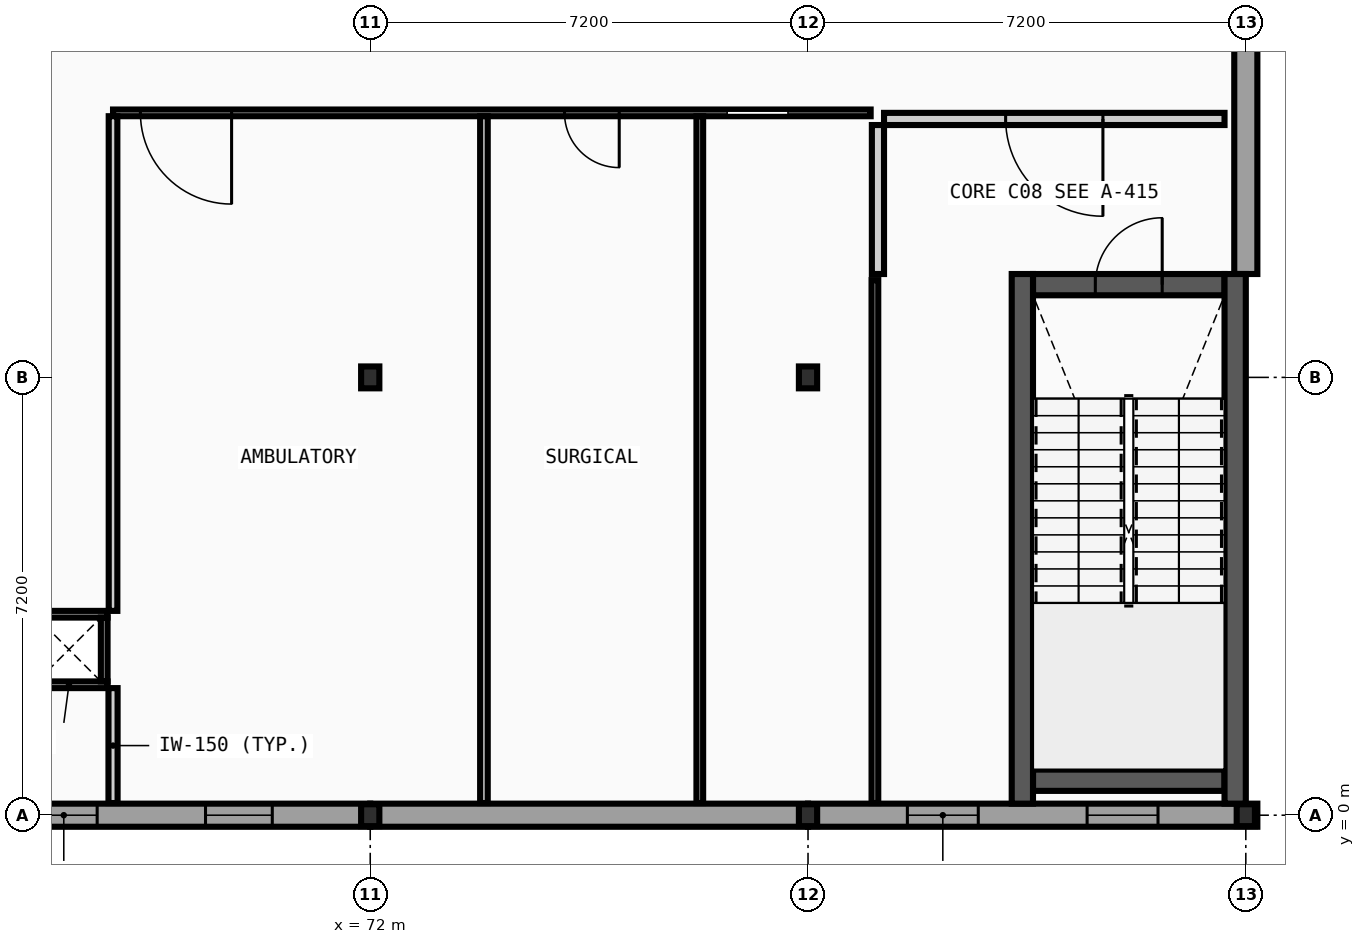
"""IFC4 building model, lengths in metres.
Left out: names, types, materials, properties, quantities, classifications, styles, units other than length and angle.
Written with IfcOpenShell. Run it as: python <this file> out.ifc"""

import sys

from ifc_helpers import new_model, si_unit, direction, frame, frame_2d, origin, origin_2d, place, context, subcontext, project, spatial, rectangle, i_section, extrude, element, fill, save


model = new_model("IFC4")
c1 = context("Model", 3, precision=1e-05, world=origin(), true_north=direction((0.0, 1.0)))
c2 = subcontext(c1, "Body", "Model", "MODEL_VIEW")
j1 = project(units=[si_unit("LENGTHUNIT", "METRE"), si_unit("PLANEANGLEUNIT", "RADIAN")], contexts=[c1])
p1 = place(None, origin())
s1 = spatial("IfcSite", under=j1, at=p1, CompositionType="ELEMENT")
p2 = place(p1, origin())
s2 = spatial("IfcBuilding", under=s1, at=p2, CompositionType="ELEMENT")
p3 = place(p2, frame((0.0, 0.0, 9.6)))
s3 = spatial("IfcBuildingStorey", under=s2, at=p3, CompositionType="ELEMENT", Elevation=9.6)
for number, where, z_axis, x_axis in (
    (1, (72.0, 0.0, 0.0), (0.0, 0.0, 1.0), (1.0, 0.0, 0.0)),
    (2, (72.0, 7.2, 0.0), (0.0, 0.0, 1.0), (1.0, 0.0, 0.0)),
    (3, (79.2, 0.0, 0.0), (0.0, 0.0, 1.0), (1.0, 0.0, 0.0)),
    (4, (79.2, 7.2, 0.0), (0.0, 0.0, 1.0), (1.0, 0.0, 0.0)),
    (5, (86.4, 0.0, 0.0), (0.0, 0.0, 1.0), (1.0, 0.0, 0.0)),
):
    element("IfcColumn", number, at=place(p3, frame(where, z_axis=z_axis, x_axis=x_axis)), inside=s3, PredefinedType="COLUMN", context=c2, shape_type="SweptSolid", body=[
        extrude(i_section(OverallWidth=0.3, OverallDepth=0.36, WebThickness=0.012, FlangeThickness=0.022, FilletRadius=0.027, at=origin_2d()), origin(), (0.0, 0.0, 1.0), 4.4),
    ])
p4 = place(p3, frame((64.8, 0.0, 0.0), z_axis=(0.0, 0.0, 1.0), x_axis=(1.0, 0.0, 0.0)))
e6 = element("IfcWall", 6, at=p4, inside=s3, PredefinedType="STANDARD", context=c2, shape_type="SweptSolid", body=[
    extrude(rectangle(XDim=7.2, YDim=0.38, at=frame_2d((3.6, 0.0))), origin(), (0.0, 0.0, 1.0), 3.895),
])
p5 = place(p4, frame((1.611, 0.0, 0.95)))
e7 = element("IfcOpeningElement", 7, at=p5, cuts=e6, PredefinedType="OPENING", context=c2, shape_type="SweptSolid", body=[
    extrude(rectangle(XDim=1.098, YDim=1.296, at=frame_2d((0.549, 0.648))), frame((0.0, 0.2, 0.0), z_axis=(0.0, -1.0, 0.0), x_axis=(1.0, 0.0, 0.0)), (0.0, 0.0, 1.0), 0.4),
])
p6 = place(p4, frame((4.491, 0.0, 0.95)))
e8 = element("IfcOpeningElement", 8, at=p6, cuts=e6, PredefinedType="OPENING", context=c2, shape_type="SweptSolid", body=[
    extrude(rectangle(XDim=1.098, YDim=1.296, at=frame_2d((0.549, 0.648))), frame((0.0, 0.2, 0.0), z_axis=(0.0, -1.0, 0.0), x_axis=(1.0, 0.0, 0.0)), (0.0, 0.0, 1.0), 0.4),
])
p7 = place(p3, frame((72.0, 0.0, 0.0), z_axis=(0.0, 0.0, 1.0), x_axis=(1.0, 0.0, 0.0)))
e9 = element("IfcWall", 9, at=p7, inside=s3, PredefinedType="STANDARD", context=c2, shape_type="SweptSolid", body=[
    extrude(rectangle(XDim=7.2, YDim=0.38, at=frame_2d((3.6, 0.0))), origin(), (0.0, 0.0, 1.0), 3.895),
])
p8 = place(p3, frame((79.2, 0.0, 0.0), z_axis=(0.0, 0.0, 1.0), x_axis=(1.0, 0.0, 0.0)))
e10 = element("IfcWall", 10, at=p8, inside=s3, PredefinedType="STANDARD", context=c2, shape_type="SweptSolid", body=[
    extrude(rectangle(XDim=7.39, YDim=0.38, at=frame_2d((3.695, 0.0))), origin(), (0.0, 0.0, 1.0), 3.895),
])
p9 = place(p8, frame((1.634, 0.0, 0.95)))
e11 = element("IfcOpeningElement", 11, at=p9, cuts=e10, PredefinedType="OPENING", context=c2, shape_type="SweptSolid", body=[
    extrude(rectangle(XDim=1.166, YDim=1.296, at=frame_2d((0.583, 0.648))), frame((0.0, 0.2, 0.0), z_axis=(0.0, -1.0, 0.0), x_axis=(1.0, 0.0, 0.0)), (0.0, 0.0, 1.0), 0.4),
])
p10 = place(p8, frame((4.59, 0.0, 0.95)))
e12 = element("IfcOpeningElement", 12, at=p10, cuts=e10, PredefinedType="OPENING", context=c2, shape_type="SweptSolid", body=[
    extrude(rectangle(XDim=1.166, YDim=1.296, at=frame_2d((0.583, 0.648))), frame((0.0, 0.2, 0.0), z_axis=(0.0, -1.0, 0.0), x_axis=(1.0, 0.0, 0.0)), (0.0, 0.0, 1.0), 0.4),
])
p11 = place(p3, frame((86.4, 8.9, 0.0), z_axis=(0.0, 0.0, 1.0), x_axis=(0.0, 1.0, 0.0)))
e13 = element("IfcWall", 13, at=p11, inside=s3, PredefinedType="STANDARD", context=c2, shape_type="SweptSolid", body=[
    extrude(rectangle(XDim=5.5, YDim=0.38, at=frame_2d((2.75, 0.0))), origin(), (0.0, 0.0, 1.0), 4.2),
])
p12 = place(p3, frame((82.9, 0.575, 0.0), z_axis=(0.0, 0.0, 1.0), x_axis=(1.0, 0.0, 0.0)))
e14 = element("IfcWall", 14, at=p12, inside=s3, PredefinedType="SHEAR", context=c2, shape_type="SweptSolid", body=[
    extrude(rectangle(XDim=3.15, YDim=0.35, at=frame_2d((1.575, 0.0))), origin(), (0.0, 0.0, 1.0), 4.2),
])
p13 = place(p3, frame((82.9, 8.725, 0.0), z_axis=(0.0, 0.0, 1.0), x_axis=(1.0, 0.0, 0.0)))
e15 = element("IfcWall", 15, at=p13, inside=s3, PredefinedType="SHEAR", context=c2, shape_type="SweptSolid", body=[
    extrude(rectangle(XDim=3.15, YDim=0.35, at=frame_2d((1.575, 0.0))), origin(), (0.0, 0.0, 1.0), 4.2),
])
p14 = place(p13, frame((1.025, 0.0, 0.0)))
e16 = element("IfcOpeningElement", 16, at=p14, cuts=e15, PredefinedType="OPENING", context=c2, shape_type="SweptSolid", body=[
    extrude(rectangle(XDim=1.1, YDim=2.15, at=frame_2d((0.55, 1.075))), frame((0.0, 0.185, 0.0), z_axis=(0.0, -1.0, 0.0), x_axis=(1.0, 0.0, 0.0)), (0.0, 0.0, 1.0), 0.37),
])
for number, where, z_axis, x_axis in (
    (17, (82.725, 0.19, 0.0), (0.0, 0.0, 1.0), (0.0, 1.0, 0.0)),
    (18, (86.225, 0.19, 0.0), (0.0, 0.0, 1.0), (0.0, 1.0, 0.0)),
):
    element("IfcWall", number, at=place(p3, frame(where, z_axis=z_axis, x_axis=x_axis)), inside=s3, PredefinedType="SHEAR", context=c2, shape_type="SweptSolid", body=[
        extrude(rectangle(XDim=8.71, YDim=0.35, at=frame_2d((4.355, 0.0))), origin(), (0.0, 0.0, 1.0), 4.2),
    ])
p15 = place(p3, frame((80.45, 11.45, 0.0), z_axis=(0.0, 0.0, 1.0), x_axis=(1.0, 0.0, 0.0)))
e19 = element("IfcWall", 19, at=p15, inside=s3, PredefinedType="PARTITIONING", context=c2, shape_type="SweptSolid", body=[
    extrude(rectangle(XDim=5.6, YDim=0.2, at=frame_2d((2.8, 0.0))), origin(), (0.0, 0.0, 1.0), 4.2),
])
p16 = place(p15, frame((2.0, 0.0, 0.0)))
e20 = element("IfcOpeningElement", 20, at=p16, cuts=e19, PredefinedType="OPENING", context=c2, shape_type="SweptSolid", body=[
    extrude(rectangle(XDim=1.6, YDim=2.2, at=frame_2d((0.8, 1.1))), frame((0.0, 0.11, 0.0), z_axis=(0.0, -1.0, 0.0), x_axis=(1.0, 0.0, 0.0)), (0.0, 0.0, 1.0), 0.22),
])
p17 = place(p3, frame((80.35, 8.9, 0.0), z_axis=(0.0, 0.0, 1.0), x_axis=(0.0, 1.0, 0.0)))
e21 = element("IfcWall", 21, at=p17, inside=s3, PredefinedType="PARTITIONING", context=c2, shape_type="SweptSolid", body=[
    extrude(rectangle(XDim=2.45, YDim=0.2, at=frame_2d((1.225, 0.0))), origin(), (0.0, 0.0, 1.0), 4.2),
])
for number, where, z_axis, x_axis in (
    (22, (66.41, 2.145, 0.0), (0.0, 0.0, 1.0), (1.0, 0.0, 0.0)),
    (23, (66.41, 3.305, 0.0), (0.0, 0.0, 1.0), (1.0, 0.0, 0.0)),
):
    element("IfcWall", number, at=place(p3, frame(where, z_axis=z_axis, x_axis=x_axis)), inside=s3, PredefinedType="PARTITIONING", context=c2, shape_type="SweptSolid", body=[
        extrude(rectangle(XDim=1.27, YDim=0.11, at=frame_2d((0.635, 0.0))), origin(), (0.0, 0.0, 1.0), 4.2),
    ])
p18 = place(p3, frame((67.625, 2.2, 0.0), z_axis=(0.0, 0.0, 1.0), x_axis=(0.0, 1.0, 0.0)))
e24 = element("IfcWall", 24, at=p18, inside=s3, PredefinedType="PARTITIONING", context=c2, shape_type="SweptSolid", body=[
    extrude(rectangle(XDim=1.05, YDim=0.11, at=frame_2d((0.525, 0.0))), origin(), (0.0, 0.0, 1.0), 4.2),
])
p19 = place(p3, frame((67.77, 11.55, 0.0), z_axis=(0.0, 0.0, 1.0), x_axis=(1.0, 0.0, 0.0)))
e25 = element("IfcWall", 25, at=p19, inside=s3, PredefinedType="PARTITIONING", context=c2, shape_type="SweptSolid", body=[
    extrude(rectangle(XDim=12.46, YDim=0.11, at=frame_2d((6.23, 0.0))), origin(), (0.0, 0.0, 1.0), 4.2),
])
p20 = place(p19, frame((10.1, 0.0, 0.0)))
e26 = element("IfcOpeningElement", 26, at=p20, cuts=e25, PredefinedType="OPENING", context=c2, shape_type="SweptSolid", body=[
    extrude(rectangle(XDim=1.0, YDim=2.1, at=frame_2d((0.5, 1.05))), frame((0.0, 0.065, 0.0), z_axis=(0.0, -1.0, 0.0), x_axis=(1.0, 0.0, 0.0)), (0.0, 0.0, 1.0), 0.13),
])
p21 = place(p19, frame((7.425, 0.0, 0.0)))
e27 = element("IfcOpeningElement", 27, at=p21, cuts=e25, PredefinedType="OPENING", context=c2, shape_type="SweptSolid", body=[
    extrude(rectangle(XDim=0.9, YDim=2.1, at=frame_2d((0.45, 1.05))), frame((0.0, 0.065, 0.0), z_axis=(0.0, -1.0, 0.0), x_axis=(1.0, 0.0, 0.0)), (0.0, 0.0, 1.0), 0.13),
])
p22 = place(p19, frame((0.45, 0.0, 0.0)))
e28 = element("IfcOpeningElement", 28, at=p22, cuts=e25, PredefinedType="OPENING", context=c2, shape_type="SweptSolid", body=[
    extrude(rectangle(XDim=1.5, YDim=2.2, at=frame_2d((0.75, 1.1))), frame((0.0, 0.065, 0.0), z_axis=(0.0, -1.0, 0.0), x_axis=(1.0, 0.0, 0.0)), (0.0, 0.0, 1.0), 0.13),
])
p23 = place(p3, frame((67.77, 0.2, 0.0), z_axis=(0.0, 0.0, 1.0), x_axis=(0.0, 1.0, 0.0)))
e29 = element("IfcWall", 29, at=p23, inside=s3, PredefinedType="PARTITIONING", context=c2, shape_type="SweptSolid", body=[
    extrude(rectangle(XDim=1.89, YDim=0.15, at=frame_2d((0.945, 0.0))), origin(), (0.0, 0.0, 1.0), 4.2),
])
p24 = place(p3, frame((67.77, 3.36, 0.0), z_axis=(0.0, 0.0, 1.0), x_axis=(0.0, 1.0, 0.0)))
e30 = element("IfcWall", 30, at=p24, inside=s3, PredefinedType="PARTITIONING", context=c2, shape_type="SweptSolid", body=[
    extrude(rectangle(XDim=8.135, YDim=0.142, at=frame_2d((4.067, 0.0))), origin(), (0.0, 0.0, 1.0), 4.2),
])
p25 = place(p3, frame((73.87, 0.2, 0.0), z_axis=(0.0, 0.0, 1.0), x_axis=(0.0, 1.0, 0.0)))
e31 = element("IfcWall", 31, at=p25, inside=s3, PredefinedType="PARTITIONING", context=c2, shape_type="SweptSolid", body=[
    extrude(rectangle(XDim=11.295, YDim=0.125, at=frame_2d((5.647, 0.0))), origin(), (0.0, 0.0, 1.0), 4.2),
])
p26 = place(p3, frame((77.42, 0.2, 0.0), z_axis=(0.0, 0.0, 1.0), x_axis=(0.0, 1.0, 0.0)))
e32 = element("IfcWall", 32, at=p26, inside=s3, PredefinedType="PARTITIONING", context=c2, shape_type="SweptSolid", body=[
    extrude(rectangle(XDim=11.295, YDim=0.11, at=frame_2d((5.647, 0.0))), origin(), (0.0, 0.0, 1.0), 4.2),
])
p27 = place(p3, frame((80.3, 0.2, 0.0), z_axis=(0.0, 0.0, 1.0), x_axis=(0.0, 1.0, 0.0)))
e33 = element("IfcWall", 33, at=p27, inside=s3, PredefinedType="PARTITIONING", context=c2, shape_type="SweptSolid", body=[
    extrude(rectangle(XDim=8.6, YDim=0.11, at=frame_2d((4.3, 0.0))), origin(), (0.0, 0.0, 1.0), 4.2),
])
p28 = place(p5, origin())
e34 = element("IfcWindow", 34, at=p28, inside=s3, PartitioningType="SINGLE_PANEL", PredefinedType="WINDOW", context=c2, shape_type="SweptSolid", body=[
    extrude(rectangle(XDim=1.098, YDim=1.296, at=frame_2d((0.549, 0.648))), frame((0.0, 0.03, 0.0), z_axis=(0.0, -1.0, 0.0), x_axis=(1.0, 0.0, 0.0)), (0.0, 0.0, 1.0), 0.06),
])
fill(e7, e34)
p29 = place(p6, origin())
e35 = element("IfcWindow", 35, at=p29, inside=s3, PartitioningType="SINGLE_PANEL", PredefinedType="WINDOW", context=c2, shape_type="SweptSolid", body=[
    extrude(rectangle(XDim=1.098, YDim=1.296, at=frame_2d((0.549, 0.648))), frame((0.0, 0.03, 0.0), z_axis=(0.0, -1.0, 0.0), x_axis=(1.0, 0.0, 0.0)), (0.0, 0.0, 1.0), 0.06),
])
fill(e8, e35)
p30 = place(p9, origin())
e36 = element("IfcWindow", 36, at=p30, inside=s3, PartitioningType="SINGLE_PANEL", PredefinedType="WINDOW", context=c2, shape_type="SweptSolid", body=[
    extrude(rectangle(XDim=1.166, YDim=1.296, at=frame_2d((0.583, 0.648))), frame((0.0, 0.03, 0.0), z_axis=(0.0, -1.0, 0.0), x_axis=(1.0, 0.0, 0.0)), (0.0, 0.0, 1.0), 0.06),
])
fill(e11, e36)
p31 = place(p10, origin())
e37 = element("IfcWindow", 37, at=p31, inside=s3, PartitioningType="SINGLE_PANEL", PredefinedType="WINDOW", context=c2, shape_type="SweptSolid", body=[
    extrude(rectangle(XDim=1.166, YDim=1.296, at=frame_2d((0.583, 0.648))), frame((0.0, 0.03, 0.0), z_axis=(0.0, -1.0, 0.0), x_axis=(1.0, 0.0, 0.0)), (0.0, 0.0, 1.0), 0.06),
])
fill(e12, e37)
p32 = place(p14, frame((1.1, 0.0, 0.0), z_axis=(0.0, 0.0, 1.0), x_axis=(-1.0, 0.0, 0.0)))
e38 = element("IfcDoor", 38, at=p32, inside=s3, OperationType="SINGLE_SWING_RIGHT", PredefinedType="DOOR", context=c2, shape_type="SweptSolid", body=[
    extrude(rectangle(XDim=1.1, YDim=2.15, at=frame_2d((0.55, 1.075))), frame((0.0, 0.025, 0.0), z_axis=(0.0, -1.0, 0.0), x_axis=(1.0, 0.0, 0.0)), (0.0, 0.0, 1.0), 0.05),
])
fill(e16, e38)
p33 = place(p16, origin())
e39 = element("IfcDoor", 39, at=p33, inside=s3, OperationType="DOUBLE_DOOR_SINGLE_SWING", PredefinedType="DOOR", context=c2, shape_type="SweptSolid", body=[
    extrude(rectangle(XDim=1.6, YDim=2.2, at=frame_2d((0.8, 1.1))), frame((0.0, 0.025, 0.0), z_axis=(0.0, -1.0, 0.0), x_axis=(1.0, 0.0, 0.0)), (0.0, 0.0, 1.0), 0.05),
])
fill(e20, e39)
p34 = place(p20, origin())
e40 = element("IfcDoor", 40, at=p34, inside=s3, OperationType="SLIDING_TO_LEFT", PredefinedType="DOOR", context=c2, shape_type="SweptSolid", body=[
    extrude(rectangle(XDim=1.0, YDim=2.1, at=frame_2d((0.5, 1.05))), frame((0.0, 0.025, 0.0), z_axis=(0.0, -1.0, 0.0), x_axis=(1.0, 0.0, 0.0)), (0.0, 0.0, 1.0), 0.05),
])
fill(e26, e40)
p35 = place(p21, origin())
e41 = element("IfcDoor", 41, at=p35, inside=s3, OperationType="SINGLE_SWING_RIGHT", PredefinedType="DOOR", context=c2, shape_type="SweptSolid", body=[
    extrude(rectangle(XDim=0.9, YDim=2.1, at=frame_2d((0.45, 1.05))), frame((0.0, 0.025, 0.0), z_axis=(0.0, -1.0, 0.0), x_axis=(1.0, 0.0, 0.0)), (0.0, 0.0, 1.0), 0.05),
])
fill(e27, e41)
p36 = place(p22, origin())
e42 = element("IfcDoor", 42, at=p36, inside=s3, OperationType="DOUBLE_DOOR_SINGLE_SWING", PredefinedType="DOOR", context=c2, shape_type="SweptSolid", body=[
    extrude(rectangle(XDim=1.5, YDim=2.2, at=frame_2d((0.75, 1.1))), frame((0.0, 0.025, 0.0), z_axis=(0.0, -1.0, 0.0), x_axis=(1.0, 0.0, 0.0)), (0.0, 0.0, 1.0), 0.05),
])
fill(e28, e42)
save(model, sys.argv[1])
